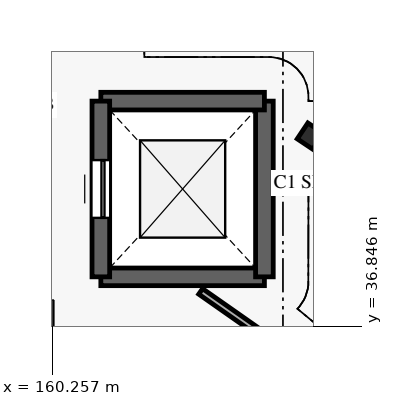
"""IFC4 building model, lengths in metres.
Left out: names, types, materials, properties, quantities, classifications, styles, units other than length and angle.
Written with IfcOpenShell. Run it as: python <this file> out.ifc"""

import sys

from ifc_helpers import new_model, si_unit, direction, frame, frame_2d, origin, origin_2d, place, context, subcontext, project, spatial, rectangle, i_section, extrude, element, fill, save


model = new_model("IFC4")
c1 = context("Model", 3, precision=1e-05, world=origin(), true_north=direction((0.0, 1.0)))
c2 = subcontext(c1, "Body", "Model", "MODEL_VIEW")
j1 = project(units=[si_unit("LENGTHUNIT", "METRE"), si_unit("PLANEANGLEUNIT", "RADIAN")], contexts=[c1])
p1 = place(None, origin())
s1 = spatial("IfcSite", under=j1, at=p1, CompositionType="ELEMENT")
p2 = place(p1, origin())
s2 = spatial("IfcBuilding", under=s1, at=p2, CompositionType="ELEMENT")
p3 = place(p2, frame((0.0, 0.0, 4.2)))
s3 = spatial("IfcBuildingStorey", under=s2, at=p3, CompositionType="ELEMENT", Elevation=4.2)
p4 = place(p3, frame((164.5, 39.97, 0.0), z_axis=(0.0, 0.0, 1.0), x_axis=(-0.831469612303, 0.55557023302, 0.0)))
e1 = element("IfcColumn", 1, at=p4, inside=s3, PredefinedType="COLUMN", context=c2, shape_type="SweptSolid", body=[
    extrude(i_section(OverallWidth=0.307, OverallDepth=0.314, WebThickness=0.012, FlangeThickness=0.019, FilletRadius=0.015, at=origin_2d()), origin(), (0.0, 0.0, 1.0), 4.2),
])
p5 = place(p3, frame((161.055, 37.655, 0.0), z_axis=(0.0, 0.0, 1.0), x_axis=(1.0, 0.0, 0.0)))
e2 = element("IfcWall", 2, at=p5, inside=s3, PredefinedType="SHEAR", context=c2, shape_type="SweptSolid", body=[
    extrude(rectangle(XDim=2.69, YDim=0.29, at=frame_2d((1.345, 0.0))), origin(), (0.0, 0.0, 1.0), 3.95),
])
p6 = place(p3, frame((163.745, 37.655, 0.0), z_axis=(0.0, 0.0, 1.0), x_axis=(0.0, 1.0, 0.0)))
e3 = element("IfcWall", 3, at=p6, inside=s3, PredefinedType="SHEAR", context=c2, shape_type="SweptSolid", body=[
    extrude(rectangle(XDim=2.89, YDim=0.29, at=frame_2d((1.445, 0.0))), origin(), (0.0, 0.0, 1.0), 3.95),
])
p7 = place(p3, frame((163.745, 40.545, 0.0), z_axis=(0.0, 0.0, 1.0), x_axis=(-1.0, 0.0, 0.0)))
e4 = element("IfcWall", 4, at=p7, inside=s3, PredefinedType="SHEAR", context=c2, shape_type="SweptSolid", body=[
    extrude(rectangle(XDim=2.69, YDim=0.29, at=frame_2d((1.345, 0.0))), origin(), (0.0, 0.0, 1.0), 3.95),
])
p8 = place(p3, frame((161.055, 40.545, 0.0), z_axis=(0.0, 0.0, 1.0), x_axis=(0.0, -1.0, 0.0)))
e5 = element("IfcWall", 5, at=p8, inside=s3, PredefinedType="SHEAR", context=c2, shape_type="SweptSolid", body=[
    extrude(rectangle(XDim=2.89, YDim=0.29, at=frame_2d((1.445, 0.0))), origin(), (0.0, 0.0, 1.0), 3.95),
])
p9 = place(p8, frame((0.97, 0.0, 0.0)))
e6 = element("IfcOpeningElement", 6, at=p9, cuts=e5, PredefinedType="OPENING", context=c2, shape_type="SweptSolid", body=[
    extrude(rectangle(XDim=0.95, YDim=2.1, at=frame_2d((0.475, 1.05))), frame((0.0, 0.155, 0.0), z_axis=(0.0, -1.0, 0.0), x_axis=(1.0, 0.0, 0.0)), (0.0, 0.0, 1.0), 0.31),
])
p10 = place(p3, frame((162.697, 37.415, 0.0), z_axis=(0.0, 0.0, 1.0), x_axis=(0.818829302434, -0.574037083711, 0.0)))
e7 = element("IfcWall", 7, at=p10, inside=s3, PredefinedType="PARTITIONING", context=c2, shape_type="SweptSolid", body=[
    extrude(rectangle(XDim=1.824, YDim=0.11, at=frame_2d((0.912, 0.0))), origin(), (0.0, 0.0, 1.0), 3.855),
])
p11 = place(p9, frame((0.95, 0.0, 0.0), z_axis=(0.0, 0.0, 1.0), x_axis=(-1.0, 0.0, 0.0)))
e8 = element("IfcDoor", 8, at=p11, inside=s3, OperationType="SLIDING_TO_LEFT", PredefinedType="DOOR", context=c2, shape_type="SweptSolid", body=[
    extrude(rectangle(XDim=0.95, YDim=2.1, at=frame_2d((0.475, 1.05))), frame((0.0, 0.025, 0.0), z_axis=(0.0, -1.0, 0.0), x_axis=(1.0, 0.0, 0.0)), (0.0, 0.0, 1.0), 0.05),
])
fill(e6, e8)
save(model, sys.argv[1])
